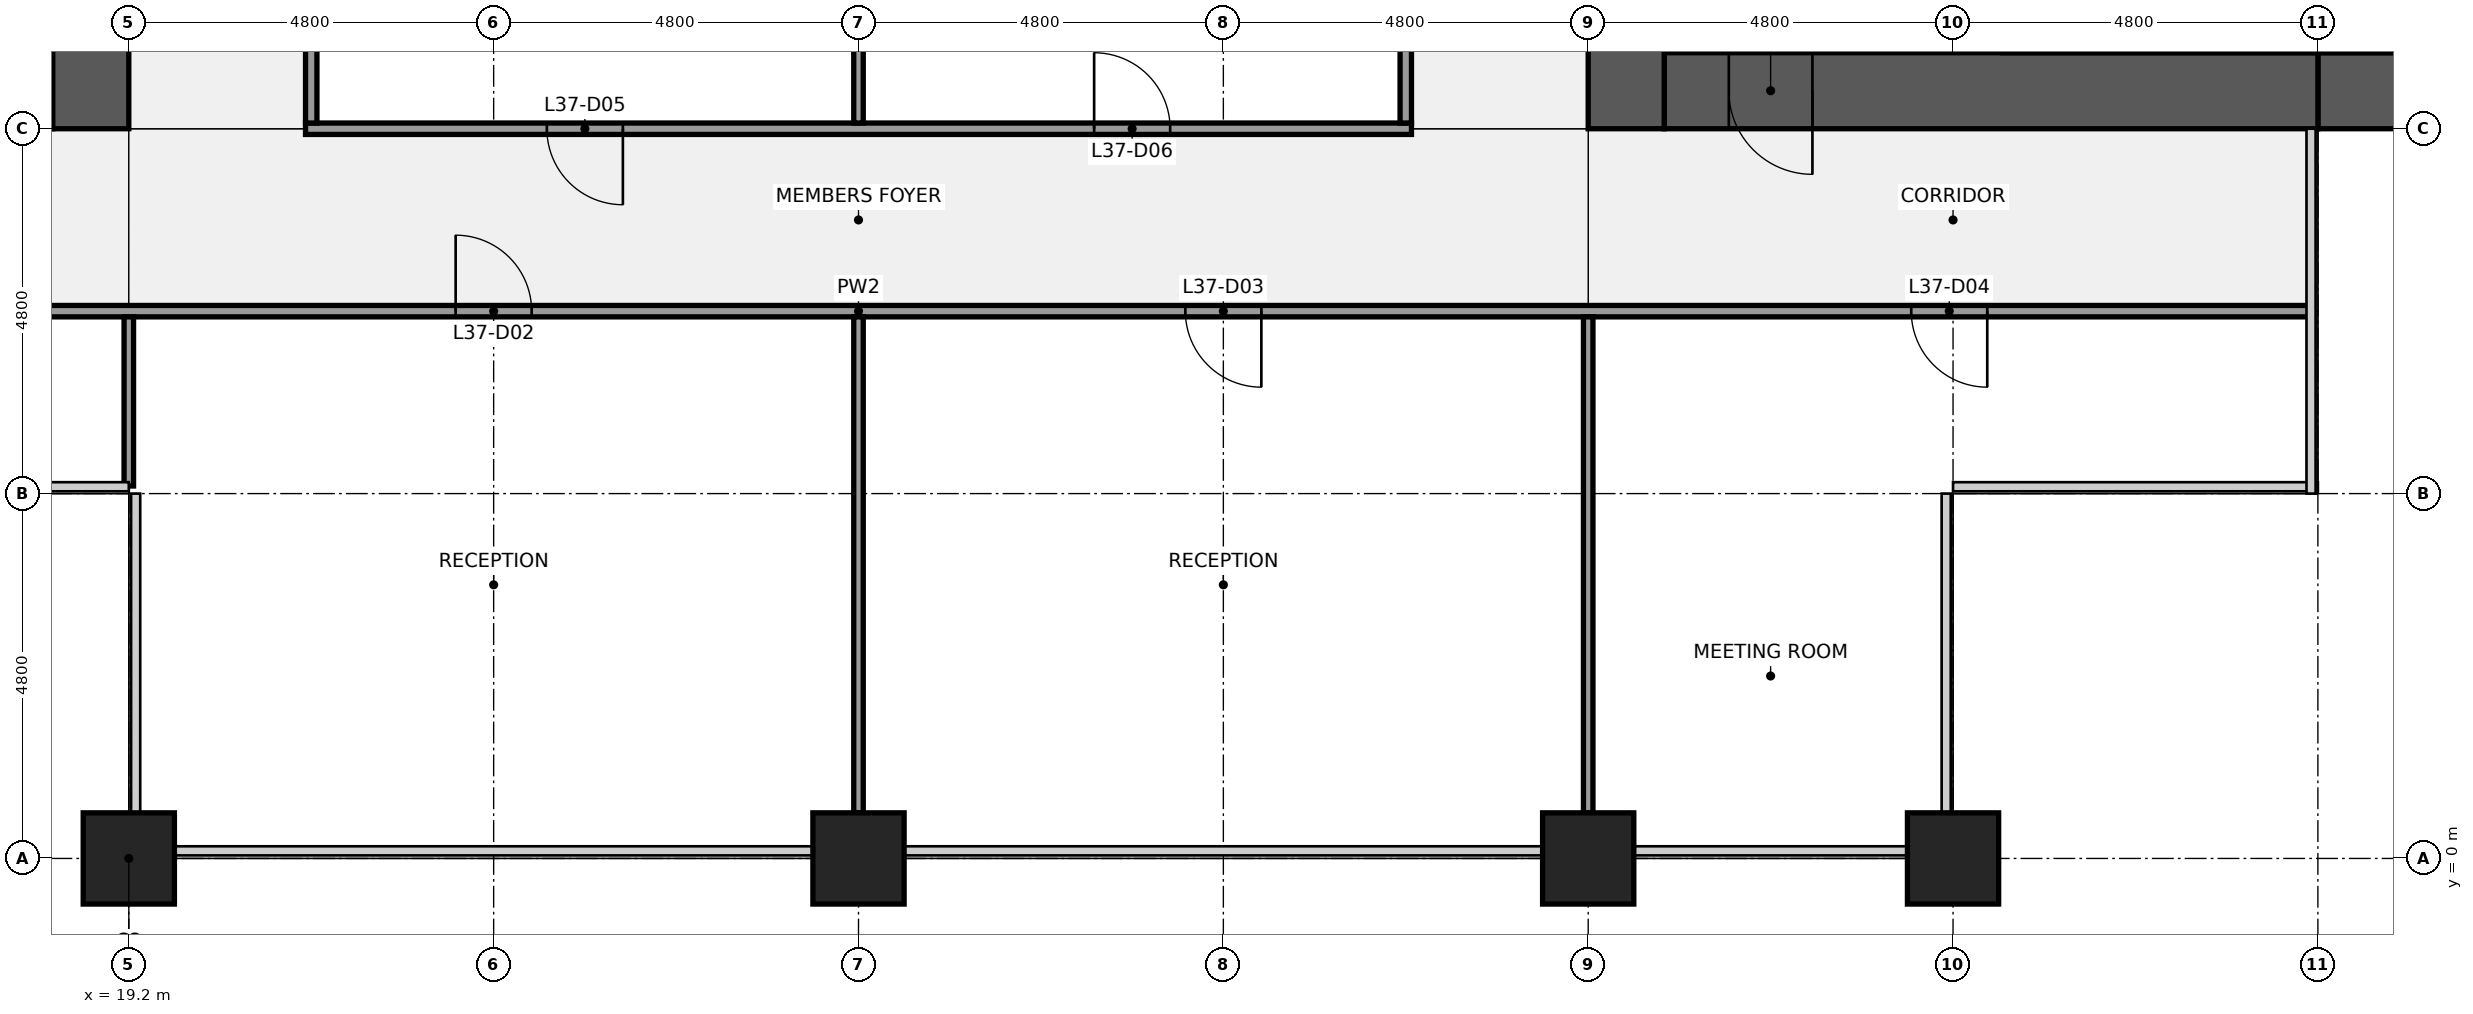
"""IFC4 building model, lengths in metres.
Left out: names, types, materials, properties, quantities, classifications, styles, units other than length and angle.
Written with IfcOpenShell. Run it as: python <this file> out.ifc"""

import sys

from ifc_helpers import new_model, si_unit, direction, frame, frame_2d, origin, origin_2d, place, context, subcontext, project, spatial, rectangle, extrude, element, fill, save


model = new_model("IFC4")
c1 = context("Model", 3, precision=1e-05, world=origin(), true_north=direction((0.0, 1.0)))
c2 = subcontext(c1, "Body", "Model", "MODEL_VIEW")
j1 = project(units=[si_unit("LENGTHUNIT", "METRE"), si_unit("PLANEANGLEUNIT", "RADIAN")], contexts=[c1])
p1 = place(None, origin())
s1 = spatial("IfcSite", under=j1, at=p1, CompositionType="ELEMENT")
p2 = place(p1, origin())
s2 = spatial("IfcBuilding", under=s1, at=p2, CompositionType="ELEMENT")
p3 = place(p2, frame((0.0, 0.0, 168.1)))
s3 = spatial("IfcBuildingStorey", under=s2, at=p3, CompositionType="ELEMENT", Elevation=168.1)
for number, where, z_axis, x_axis in (
    (1, (19.2, 0.0, 0.0), (0.0, 0.0, 1.0), (1.0, 0.0, 0.0)),
    (2, (28.8, 0.0, 0.0), (0.0, 0.0, 1.0), (1.0, 0.0, 0.0)),
    (3, (38.4, 0.0, 0.0), (0.0, 0.0, 1.0), (1.0, 0.0, 0.0)),
    (4, (43.2, 0.0, 0.0), (0.0, 0.0, 1.0), (1.0, 0.0, 0.0)),
):
    element("IfcColumn", number, at=place(p3, frame(where, z_axis=z_axis, x_axis=x_axis)), inside=s3, PredefinedType="COLUMN", context=c2, shape_type="SweptSolid", body=[
        extrude(rectangle(XDim=1.2, YDim=1.2, at=origin_2d()), origin(), (0.0, 0.0, 1.0), 4.0),
    ])
p4 = place(p3, frame((18.2, 10.1, 0.0), z_axis=(0.0, 0.0, 1.0), x_axis=(-1.0, 0.0, 0.0)))
e5 = element("IfcWall", 5, at=p4, inside=s3, PredefinedType="SHEAR", context=c2, shape_type="SweptSolid", body=[
    extrude(rectangle(XDim=8.6, YDim=1.0, at=frame_2d((4.3, 0.0))), origin(), (0.0, 0.0, 1.0), 3.84),
])
p5 = place(p4, frame((0.85, 0.0, 0.0)))
e6 = element("IfcOpeningElement", 6, at=p5, cuts=e5, PredefinedType="OPENING", context=c2, shape_type="SweptSolid", body=[
    extrude(rectangle(XDim=1.1, YDim=2.1, at=frame_2d((0.55, 1.05))), frame((0.0, 0.51, 0.0), z_axis=(0.0, -1.0, 0.0), x_axis=(1.0, 0.0, 0.0)), (0.0, 0.0, 1.0), 1.02),
])
p6 = place(p3, frame((18.7, 38.4, 0.0), z_axis=(0.0, 0.0, 1.0), x_axis=(0.0, -1.0, 0.0)))
e7 = element("IfcWall", 7, at=p6, inside=s3, PredefinedType="SHEAR", context=c2, shape_type="SweptSolid", body=[
    extrude(rectangle(XDim=28.8, YDim=1.0, at=frame_2d((14.4, 0.0))), origin(), (0.0, 0.0, 1.0), 3.84),
])
p7 = place(p6, frame((18.3, 0.0, 0.0)))
e8 = element("IfcOpeningElement", 8, at=p7, cuts=e7, PredefinedType="OPENING", context=c2, shape_type="SweptSolid", body=[
    extrude(rectangle(XDim=1.8, YDim=2.1, at=frame_2d((0.9, 1.05))), frame((0.0, 0.51, 0.0), z_axis=(0.0, -1.0, 0.0), x_axis=(1.0, 0.0, 0.0)), (0.0, 0.0, 1.0), 1.02),
])
p8 = place(p6, frame((8.7, 0.0, 0.0)))
e9 = element("IfcOpeningElement", 9, at=p8, cuts=e7, PredefinedType="OPENING", context=c2, shape_type="SweptSolid", body=[
    extrude(rectangle(XDim=1.8, YDim=2.1, at=frame_2d((0.9, 1.05))), frame((0.0, 0.51, 0.0), z_axis=(0.0, -1.0, 0.0), x_axis=(1.0, 0.0, 0.0)), (0.0, 0.0, 1.0), 1.02),
])
p9 = place(p3, frame((56.6, 10.1, 0.0), z_axis=(0.0, 0.0, 1.0), x_axis=(-1.0, 0.0, 0.0)))
e10 = element("IfcWall", 10, at=p9, inside=s3, PredefinedType="SHEAR", context=c2, shape_type="SweptSolid", body=[
    extrude(rectangle(XDim=8.6, YDim=1.0, at=frame_2d((4.3, 0.0))), origin(), (0.0, 0.0, 1.0), 3.84),
])
p10 = place(p9, frame((5.3, 0.0, 0.9)))
e11 = element("IfcOpeningElement", 11, at=p10, cuts=e10, PredefinedType="OPENING", context=c2, shape_type="SweptSolid", body=[
    extrude(rectangle(XDim=1.8, YDim=1.5, at=frame_2d((0.9, 0.75))), frame((0.0, 0.51, 0.0), z_axis=(0.0, -1.0, 0.0), x_axis=(1.0, 0.0, 0.0)), (0.0, 0.0, 1.0), 1.02),
])
p11 = place(p3, frame((48.0, 10.1, 0.0), z_axis=(0.0, 0.0, 1.0), x_axis=(-1.0, 0.0, 0.0)))
e12 = element("IfcWall", 12, at=p11, inside=s3, PredefinedType="SHEAR", context=c2, shape_type="SweptSolid", body=[
    extrude(rectangle(XDim=8.6, YDim=1.0, at=frame_2d((4.3, 0.0))), origin(), (0.0, 0.0, 1.0), 3.84),
])
p12 = place(p11, frame((6.65, 0.0, 0.0)))
e13 = element("IfcOpeningElement", 13, at=p12, cuts=e12, PredefinedType="OPENING", context=c2, shape_type="SweptSolid", body=[
    extrude(rectangle(XDim=1.1, YDim=2.1, at=frame_2d((0.55, 1.05))), frame((0.0, 0.51, 0.0), z_axis=(0.0, -1.0, 0.0), x_axis=(1.0, 0.0, 0.0)), (0.0, 0.0, 1.0), 1.02),
])
p13 = place(p3, frame((38.9, 9.6, 0.0), z_axis=(0.0, 0.0, 1.0), x_axis=(0.0, 1.0, 0.0)))
e14 = element("IfcWall", 14, at=p13, inside=s3, PredefinedType="SHEAR", context=c2, shape_type="SweptSolid", body=[
    extrude(rectangle(XDim=28.8, YDim=1.0, at=frame_2d((14.4, 0.0))), origin(), (0.0, 0.0, 1.0), 3.84),
])
p14 = place(p13, frame((8.7, 0.0, 0.0)))
e15 = element("IfcOpeningElement", 15, at=p14, cuts=e14, PredefinedType="OPENING", context=c2, shape_type="SweptSolid", body=[
    extrude(rectangle(XDim=1.8, YDim=2.1, at=frame_2d((0.9, 1.05))), frame((0.0, 0.51, 0.0), z_axis=(0.0, -1.0, 0.0), x_axis=(1.0, 0.0, 0.0)), (0.0, 0.0, 1.0), 1.02),
])
p15 = place(p13, frame((18.3, 0.0, 0.0)))
e16 = element("IfcOpeningElement", 16, at=p15, cuts=e14, PredefinedType="OPENING", context=c2, shape_type="SweptSolid", body=[
    extrude(rectangle(XDim=1.8, YDim=2.1, at=frame_2d((0.9, 1.05))), frame((0.0, 0.51, 0.0), z_axis=(0.0, -1.0, 0.0), x_axis=(1.0, 0.0, 0.0)), (0.0, 0.0, 1.0), 1.02),
])
p16 = place(p3, frame((48.0, 10.7, 0.0), z_axis=(0.0, 0.0, 1.0), x_axis=(1.0, 0.0, 0.0)))
e17 = element("IfcWall", 17, at=p16, inside=s3, PredefinedType="SHEAR", context=c2, shape_type="SweptSolid", body=[
    extrude(rectangle(XDim=3.35, YDim=0.2, at=frame_2d((1.675, 0.0))), origin(), (0.0, 0.0, 1.0), 3.84),
])
p17 = place(p3, frame((43.85, 10.7, 0.0), z_axis=(0.0, 0.0, 1.0), x_axis=(1.0, 0.0, 0.0)))
e18 = element("IfcWall", 18, at=p17, inside=s3, PredefinedType="SHEAR", context=c2, shape_type="SweptSolid", body=[
    extrude(rectangle(XDim=4.15, YDim=0.2, at=frame_2d((2.075, 0.0))), origin(), (0.0, 0.0, 1.0), 3.84),
])
p18 = place(p3, frame((9.7, 7.2, 0.0), z_axis=(0.0, 0.0, 1.0), x_axis=(1.0, 0.0, 0.0)))
e19 = element("IfcWall", 19, at=p18, inside=s3, PredefinedType="PARTITIONING", context=c2, shape_type="SweptSolid", body=[
    extrude(rectangle(XDim=38.2, YDim=0.15, at=frame_2d((19.1, 0.0))), origin(), (0.0, 0.0, 1.0), 2.936),
])
p19 = place(p18, frame((4.25, 0.0, 0.0)))
e20 = element("IfcOpeningElement", 20, at=p19, cuts=e19, PredefinedType="OPENING", context=c2, shape_type="SweptSolid", body=[
    extrude(rectangle(XDim=1.0, YDim=2.1, at=frame_2d((0.5, 1.05))), frame((0.0, 0.085, 0.0), z_axis=(0.0, -1.0, 0.0), x_axis=(1.0, 0.0, 0.0)), (0.0, 0.0, 1.0), 0.17),
])
p20 = place(p18, frame((13.8, 0.0, 0.0)))
e21 = element("IfcOpeningElement", 21, at=p20, cuts=e19, PredefinedType="OPENING", context=c2, shape_type="SweptSolid", body=[
    extrude(rectangle(XDim=1.0, YDim=2.1, at=frame_2d((0.5, 1.05))), frame((0.0, 0.085, 0.0), z_axis=(0.0, -1.0, 0.0), x_axis=(1.0, 0.0, 0.0)), (0.0, 0.0, 1.0), 0.17),
])
p21 = place(p18, frame((23.4, 0.0, 0.0)))
e22 = element("IfcOpeningElement", 22, at=p21, cuts=e19, PredefinedType="OPENING", context=c2, shape_type="SweptSolid", body=[
    extrude(rectangle(XDim=1.0, YDim=2.1, at=frame_2d((0.5, 1.05))), frame((0.0, 0.085, 0.0), z_axis=(0.0, -1.0, 0.0), x_axis=(1.0, 0.0, 0.0)), (0.0, 0.0, 1.0), 0.17),
])
p22 = place(p18, frame((32.95, 0.0, 0.0)))
e23 = element("IfcOpeningElement", 23, at=p22, cuts=e19, PredefinedType="OPENING", context=c2, shape_type="SweptSolid", body=[
    extrude(rectangle(XDim=1.0, YDim=2.1, at=frame_2d((0.5, 1.05))), frame((0.0, 0.085, 0.0), z_axis=(0.0, -1.0, 0.0), x_axis=(1.0, 0.0, 0.0)), (0.0, 0.0, 1.0), 0.17),
])
p23 = place(p3, frame((21.525, 9.6, 0.0), z_axis=(0.0, 0.0, 1.0), x_axis=(1.0, 0.0, 0.0)))
e24 = element("IfcWall", 24, at=p23, inside=s3, PredefinedType="PARTITIONING", context=c2, shape_type="SweptSolid", body=[
    extrude(rectangle(XDim=14.55, YDim=0.15, at=frame_2d((7.275, 0.0))), origin(), (0.0, 0.0, 1.0), 2.936),
])
p24 = place(p23, frame((3.175, 0.0, 0.0)))
e25 = element("IfcOpeningElement", 25, at=p24, cuts=e24, PredefinedType="OPENING", context=c2, shape_type="SweptSolid", body=[
    extrude(rectangle(XDim=1.0, YDim=2.1, at=frame_2d((0.5, 1.05))), frame((0.0, 0.085, 0.0), z_axis=(0.0, -1.0, 0.0), x_axis=(1.0, 0.0, 0.0)), (0.0, 0.0, 1.0), 0.17),
])
p25 = place(p23, frame((10.375, 0.0, 0.0)))
e26 = element("IfcOpeningElement", 26, at=p25, cuts=e24, PredefinedType="OPENING", context=c2, shape_type="SweptSolid", body=[
    extrude(rectangle(XDim=1.0, YDim=2.1, at=frame_2d((0.5, 1.05))), frame((0.0, 0.085, 0.0), z_axis=(0.0, -1.0, 0.0), x_axis=(1.0, 0.0, 0.0)), (0.0, 0.0, 1.0), 0.17),
])
p26 = place(p3, frame((19.2, 4.9, 0.0), z_axis=(0.0, 0.0, 1.0), x_axis=(0.0, 1.0, 0.0)))
e27 = element("IfcWall", 27, at=p26, inside=s3, PredefinedType="PARTITIONING", context=c2, shape_type="SweptSolid", body=[
    extrude(rectangle(XDim=2.225, YDim=0.125, at=frame_2d((1.113, 0.0))), origin(), (0.0, 0.0, 1.0), 2.936),
])
p27 = place(p3, frame((21.6, 9.675, 0.0), z_axis=(0.0, 0.0, 1.0), x_axis=(0.0, 1.0, 0.0)))
e28 = element("IfcWall", 28, at=p27, inside=s3, PredefinedType="PARTITIONING", context=c2, shape_type="SweptSolid", body=[
    extrude(rectangle(XDim=4.65, YDim=0.15, at=frame_2d((2.325, 0.0))), origin(), (0.0, 0.0, 1.0), 2.936),
])
p28 = place(p3, frame((28.8, 0.6, 0.0), z_axis=(0.0, 0.0, 1.0), x_axis=(0.0, 1.0, 0.0)))
e29 = element("IfcWall", 29, at=p28, inside=s3, PredefinedType="PARTITIONING", context=c2, shape_type="SweptSolid", body=[
    extrude(rectangle(XDim=6.525, YDim=0.125, at=frame_2d((3.262, 0.0))), origin(), (0.0, 0.0, 1.0), 2.936),
])
p29 = place(p3, frame((28.8, 9.675, 0.0), z_axis=(0.0, 0.0, 1.0), x_axis=(0.0, 1.0, 0.0)))
e30 = element("IfcWall", 30, at=p29, inside=s3, PredefinedType="PARTITIONING", context=c2, shape_type="SweptSolid", body=[
    extrude(rectangle(XDim=4.662, YDim=0.125, at=frame_2d((2.331, 0.0))), origin(), (0.0, 0.0, 1.0), 2.936),
])
p30 = place(p3, frame((36.0, 9.675, 0.0), z_axis=(0.0, 0.0, 1.0), x_axis=(0.0, 1.0, 0.0)))
e31 = element("IfcWall", 31, at=p30, inside=s3, PredefinedType="PARTITIONING", context=c2, shape_type="SweptSolid", body=[
    extrude(rectangle(XDim=4.65, YDim=0.15, at=frame_2d((2.325, 0.0))), origin(), (0.0, 0.0, 1.0), 2.936),
])
p31 = place(p3, frame((38.4, 0.6, 0.0), z_axis=(0.0, 0.0, 1.0), x_axis=(0.0, 1.0, 0.0)))
e32 = element("IfcWall", 32, at=p31, inside=s3, PredefinedType="PARTITIONING", context=c2, shape_type="SweptSolid", body=[
    extrude(rectangle(XDim=6.525, YDim=0.125, at=frame_2d((3.262, 0.0))), origin(), (0.0, 0.0, 1.0), 2.936),
])
for number, where, z_axis, x_axis in (
    (33, (19.2, -1.05, 0.0), (0.0, 0.0, 1.0), (1.0, 0.0, 0.0)),
    (34, (38.4, -1.05, 0.0), (0.0, 0.0, 1.0), (1.0, 0.0, 0.0)),
    (35, (43.2, -1.05, 0.0), (0.0, 0.0, 1.0), (1.0, 0.0, 0.0)),
):
    element("IfcColumn", number, at=place(p3, frame(where, z_axis=z_axis, x_axis=x_axis)), inside=s3, PredefinedType="PILASTER", context=c2, shape_type="SweptSolid", body=[
        extrude(rectangle(XDim=3.6, YDim=0.9, at=origin_2d()), origin(), (0.0, 0.0, 1.0), 4.0),
    ])
p32 = place(p12, origin())
e36 = element("IfcDoor", 36, at=p32, inside=s3, OperationType="SINGLE_SWING_LEFT", PredefinedType="DOOR", context=c2, shape_type="SweptSolid", body=[
    extrude(rectangle(XDim=1.1, YDim=2.1, at=frame_2d((0.55, 1.05))), frame((0.0, 0.025, 0.0), z_axis=(0.0, -1.0, 0.0), x_axis=(1.0, 0.0, 0.0)), (0.0, 0.0, 1.0), 0.05),
])
fill(e13, e36)
p33 = place(p20, origin())
e37 = element("IfcDoor", 37, at=p33, inside=s3, OperationType="SINGLE_SWING_LEFT", PredefinedType="DOOR", context=c2, shape_type="SweptSolid", body=[
    extrude(rectangle(XDim=1.0, YDim=2.1, at=frame_2d((0.5, 1.05))), frame((0.0, 0.025, 0.0), z_axis=(0.0, -1.0, 0.0), x_axis=(1.0, 0.0, 0.0)), (0.0, 0.0, 1.0), 0.05),
])
fill(e21, e37)
p34 = place(p21, origin())
e38 = element("IfcDoor", 38, at=p34, inside=s3, OperationType="SINGLE_SWING_RIGHT", PredefinedType="DOOR", context=c2, shape_type="SweptSolid", body=[
    extrude(rectangle(XDim=1.0, YDim=2.1, at=frame_2d((0.5, 1.05))), frame((0.0, 0.025, 0.0), z_axis=(0.0, -1.0, 0.0), x_axis=(1.0, 0.0, 0.0)), (0.0, 0.0, 1.0), 0.05),
])
fill(e22, e38)
p35 = place(p22, origin())
e39 = element("IfcDoor", 39, at=p35, inside=s3, OperationType="SINGLE_SWING_RIGHT", PredefinedType="DOOR", context=c2, shape_type="SweptSolid", body=[
    extrude(rectangle(XDim=1.0, YDim=2.1, at=frame_2d((0.5, 1.05))), frame((0.0, 0.025, 0.0), z_axis=(0.0, -1.0, 0.0), x_axis=(1.0, 0.0, 0.0)), (0.0, 0.0, 1.0), 0.05),
])
fill(e23, e39)
p36 = place(p24, origin())
e40 = element("IfcDoor", 40, at=p36, inside=s3, OperationType="SINGLE_SWING_RIGHT", PredefinedType="DOOR", context=c2, shape_type="SweptSolid", body=[
    extrude(rectangle(XDim=1.0, YDim=2.1, at=frame_2d((0.5, 1.05))), frame((0.0, 0.025, 0.0), z_axis=(0.0, -1.0, 0.0), x_axis=(1.0, 0.0, 0.0)), (0.0, 0.0, 1.0), 0.05),
])
fill(e25, e40)
p37 = place(p25, origin())
e41 = element("IfcDoor", 41, at=p37, inside=s3, OperationType="SINGLE_SWING_LEFT", PredefinedType="DOOR", context=c2, shape_type="SweptSolid", body=[
    extrude(rectangle(XDim=1.0, YDim=2.1, at=frame_2d((0.5, 1.05))), frame((0.0, 0.025, 0.0), z_axis=(0.0, -1.0, 0.0), x_axis=(1.0, 0.0, 0.0)), (0.0, 0.0, 1.0), 0.05),
])
fill(e26, e41)
save(model, sys.argv[1])
